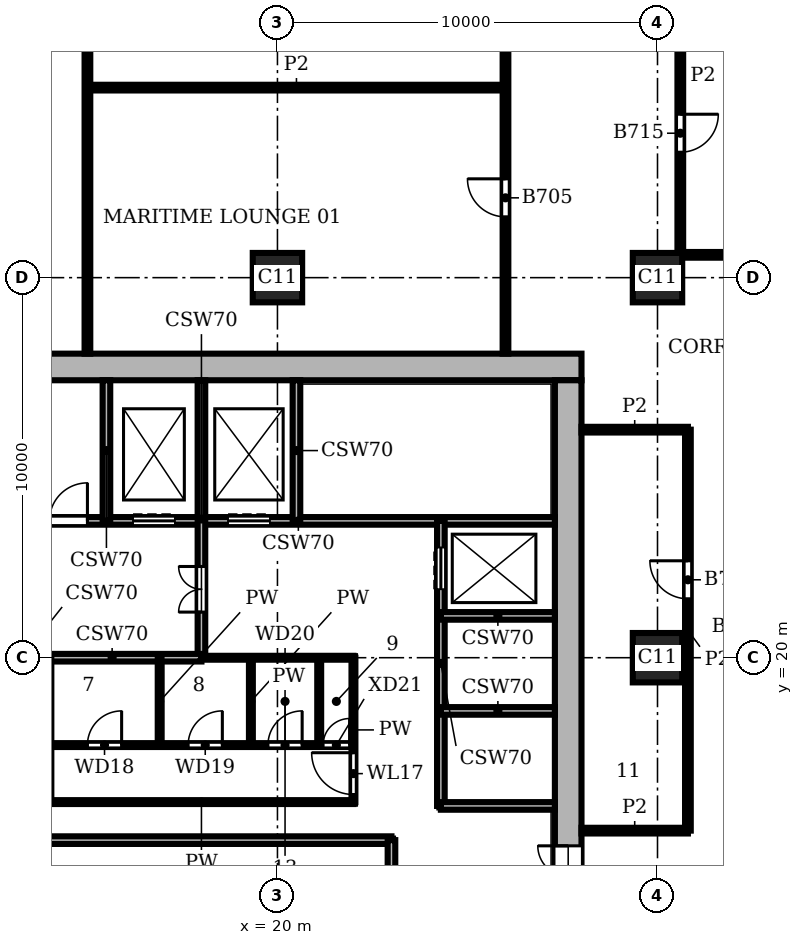
"""IFC4 building model, lengths in metres.
Left out: names, types, materials, properties, quantities, classifications, styles, units other than length and angle.
Written with IfcOpenShell. Run it as: python <this file> out.ifc"""

import sys

from ifc_helpers import new_model, si_unit, direction, frame, frame_2d, origin, origin_2d, place, context, subcontext, project, spatial, rectangle, extrude, element, fill, save


model = new_model("IFC4")
c1 = context("Model", 3, precision=1e-05, world=origin(), true_north=direction((0.0, 1.0)))
c2 = subcontext(c1, "Body", "Model", "MODEL_VIEW")
j1 = project(units=[si_unit("LENGTHUNIT", "METRE"), si_unit("PLANEANGLEUNIT", "RADIAN")], contexts=[c1])
p1 = place(None, origin())
s1 = spatial("IfcSite", under=j1, at=p1, CompositionType="ELEMENT")
p2 = place(p1, origin())
s2 = spatial("IfcBuilding", under=s1, at=p2, CompositionType="ELEMENT")
p3 = place(p2, frame((0.0, 0.0, 201.9)))
s3 = spatial("IfcBuildingStorey", under=s2, at=p3, CompositionType="ELEMENT", Elevation=201.9)
for number, where, z_axis, x_axis in (
    (1, (20.0, 30.0, 0.0), (0.0, 0.0, 1.0), (1.0, 0.0, 0.0)),
    (2, (30.0, 20.0, 0.0), (0.0, 0.0, 1.0), (1.0, 0.0, 0.0)),
    (3, (30.0, 30.0, 0.0), (0.0, 0.0, 1.0), (1.0, 0.0, 0.0)),
):
    element("IfcColumn", number, at=place(p3, frame(where, z_axis=z_axis, x_axis=x_axis)), inside=s3, PredefinedType="COLUMN", context=c2, shape_type="SweptSolid", body=[
        extrude(rectangle(XDim=1.3, YDim=1.3, at=origin_2d()), origin(), (0.0, 0.0, 1.0), 3.9),
    ])
p4 = place(p3, frame((27.65, 8.7, 0.0), z_axis=(0.0, 0.0, 1.0), x_axis=(0.0, 1.0, 0.0)))
e4 = element("IfcWall", 4, at=p4, inside=s3, PredefinedType="SHEAR", context=c2, shape_type="SweptSolid", body=[
    extrude(rectangle(XDim=18.6, YDim=0.7, at=frame_2d((9.3, 0.0))), origin(), (0.0, 0.0, 1.0), 3.9),
])
p5 = place(p4, frame((4.75, 0.0, 0.0)))
e5 = element("IfcOpeningElement", 5, at=p5, cuts=e4, PredefinedType="OPENING", context=c2, shape_type="SweptSolid", body=[
    extrude(rectangle(XDim=1.6, YDim=2.1, at=frame_2d((0.8, 1.05))), frame((0.0, 0.36, 0.0), z_axis=(0.0, -1.0, 0.0), x_axis=(1.0, 0.0, 0.0)), (0.0, 0.0, 1.0), 0.72),
])
p6 = place(p3, frame((28.0, 27.65, 0.0), z_axis=(0.0, 0.0, 1.0), x_axis=(-1.0, 0.0, 0.0)))
e6 = element("IfcWall", 6, at=p6, inside=s3, PredefinedType="SHEAR", context=c2, shape_type="SweptSolid", body=[
    extrude(rectangle(XDim=20.0, YDim=0.7, at=frame_2d((10.0, 0.0))), origin(), (0.0, 0.0, 1.0), 3.9),
])
p7 = place(p3, frame((33.362, 33.974, 0.0), z_axis=(0.0, 0.0, 1.0), x_axis=(-0.382655745237, 0.923891000409, 0.0)))
e7 = element("IfcWall", 7, at=p7, inside=s3, PredefinedType="SOLIDWALL", context=c2, shape_type="SweptSolid", body=[
    extrude(rectangle(XDim=6.053, YDim=0.4, at=frame_2d((3.027, 0.0))), origin(), (0.0, 0.0, 1.0), 3.9),
])
p8 = place(p7, frame((0.227, 0.0, 0.9)))
e8 = element("IfcOpeningElement", 8, at=p8, cuts=e7, PredefinedType="OPENING", context=c2, shape_type="SweptSolid", body=[
    extrude(rectangle(XDim=5.6, YDim=2.35, at=frame_2d((2.8, 1.175))), frame((0.0, 0.21, 0.0), z_axis=(0.0, -1.0, 0.0), x_axis=(1.0, 0.0, 0.0)), (0.0, 0.0, 1.0), 0.42),
])
p9 = place(p3, frame((13.3, 15.2, 0.0), z_axis=(0.0, 0.0, 1.0), x_axis=(1.0, 0.0, 0.0)))
e9 = element("IfcWall", 9, at=p9, inside=s3, PredefinedType="SHEAR", context=c2, shape_type="SweptSolid", body=[
    extrude(rectangle(XDim=9.7, YDim=0.2, at=frame_2d((4.85, 0.0))), origin(), (0.0, 0.0, 1.0), 3.58),
])
p10 = place(p3, frame((24.3, 16.1, 0.0), z_axis=(0.0, 0.0, 1.0), x_axis=(1.0, 0.0, 0.0)))
e10 = element("IfcWall", 10, at=p10, inside=s3, PredefinedType="SHEAR", context=c2, shape_type="SweptSolid", body=[
    extrude(rectangle(XDim=3.0, YDim=0.2, at=frame_2d((1.5, 0.0))), origin(), (0.0, 0.0, 1.0), 3.58),
])
p11 = place(p3, frame((14.0, 16.2, 0.0), z_axis=(0.0, 0.0, 1.0), x_axis=(1.0, 0.0, 0.0)))
e11 = element("IfcWall", 11, at=p11, inside=s3, PredefinedType="PARTITIONING", context=c2, shape_type="SweptSolid", body=[
    extrude(rectangle(XDim=8.0, YDim=0.1, at=frame_2d((4.0, 0.0))), origin(), (0.0, 0.0, 1.0), 3.58),
])
p12 = place(p3, frame((14.0, 17.7, 0.0), z_axis=(0.0, 0.0, 1.0), x_axis=(1.0, 0.0, 0.0)))
e12 = element("IfcWall", 12, at=p12, inside=s3, PredefinedType="PARTITIONING", context=c2, shape_type="SweptSolid", body=[
    extrude(rectangle(XDim=8.0, YDim=0.1, at=frame_2d((4.0, 0.0))), origin(), (0.0, 0.0, 1.0), 3.58),
])
p13 = place(p12, frame((1.0, 0.0, 0.0)))
e13 = element("IfcOpeningElement", 13, at=p13, cuts=e12, PredefinedType="OPENING", context=c2, shape_type="SweptSolid", body=[
    extrude(rectangle(XDim=0.9, YDim=2.1, at=frame_2d((0.45, 1.05))), frame((0.0, 0.06, 0.0), z_axis=(0.0, -1.0, 0.0), x_axis=(1.0, 0.0, 0.0)), (0.0, 0.0, 1.0), 0.12),
])
p14 = place(p12, frame((3.65, 0.0, 0.0)))
e14 = element("IfcOpeningElement", 14, at=p14, cuts=e12, PredefinedType="OPENING", context=c2, shape_type="SweptSolid", body=[
    extrude(rectangle(XDim=0.9, YDim=2.1, at=frame_2d((0.45, 1.05))), frame((0.0, 0.06, 0.0), z_axis=(0.0, -1.0, 0.0), x_axis=(1.0, 0.0, 0.0)), (0.0, 0.0, 1.0), 0.12),
])
p15 = place(p12, frame((5.75, 0.0, 0.0)))
e15 = element("IfcOpeningElement", 15, at=p15, cuts=e12, PredefinedType="OPENING", context=c2, shape_type="SweptSolid", body=[
    extrude(rectangle(XDim=0.9, YDim=2.1, at=frame_2d((0.45, 1.05))), frame((0.0, 0.06, 0.0), z_axis=(0.0, -1.0, 0.0), x_axis=(1.0, 0.0, 0.0)), (0.0, 0.0, 1.0), 0.12),
])
p16 = place(p12, frame((7.2, 0.0, 0.0)))
e16 = element("IfcOpeningElement", 16, at=p16, cuts=e12, PredefinedType="OPENING", context=c2, shape_type="SweptSolid", body=[
    extrude(rectangle(XDim=0.7, YDim=2.1, at=frame_2d((0.35, 1.05))), frame((0.0, 0.06, 0.0), z_axis=(0.0, -1.0, 0.0), x_axis=(1.0, 0.0, 0.0)), (0.0, 0.0, 1.0), 0.12),
])
p17 = place(p3, frame((24.3, 18.6, 0.0), z_axis=(0.0, 0.0, 1.0), x_axis=(1.0, 0.0, 0.0)))
e17 = element("IfcWall", 17, at=p17, inside=s3, PredefinedType="SHEAR", context=c2, shape_type="SweptSolid", body=[
    extrude(rectangle(XDim=3.0, YDim=0.2, at=frame_2d((1.5, 0.0))), origin(), (0.0, 0.0, 1.0), 3.58),
])
p18 = place(p3, frame((18.0, 20.0, 0.0), z_axis=(0.0, 0.0, 1.0), x_axis=(1.0, 0.0, 0.0)))
e18 = element("IfcWall", 18, at=p18, inside=s3, PredefinedType="PARTITIONING", context=c2, shape_type="SweptSolid", body=[
    extrude(rectangle(XDim=4.0, YDim=0.1, at=frame_2d((2.0, 0.0))), origin(), (0.0, 0.0, 1.0), 3.58),
])
p19 = place(p3, frame((13.3, 20.0, 0.0), z_axis=(0.0, 0.0, 1.0), x_axis=(1.0, 0.0, 0.0)))
e19 = element("IfcWall", 19, at=p19, inside=s3, PredefinedType="SHEAR", context=c2, shape_type="SweptSolid", body=[
    extrude(rectangle(XDim=4.7, YDim=0.2, at=frame_2d((2.35, 0.0))), origin(), (0.0, 0.0, 1.0), 3.58),
])
p20 = place(p3, frame((24.3, 21.1, 0.0), z_axis=(0.0, 0.0, 1.0), x_axis=(1.0, 0.0, 0.0)))
e20 = element("IfcWall", 20, at=p20, inside=s3, PredefinedType="SHEAR", context=c2, shape_type="SweptSolid", body=[
    extrude(rectangle(XDim=3.0, YDim=0.2, at=frame_2d((1.5, 0.0))), origin(), (0.0, 0.0, 1.0), 3.58),
])
p21 = place(p3, frame((13.8, 23.6, 0.0), z_axis=(0.0, 0.0, 1.0), x_axis=(1.0, 0.0, 0.0)))
e21 = element("IfcWall", 21, at=p21, inside=s3, PredefinedType="SHEAR", context=c2, shape_type="SweptSolid", body=[
    extrude(rectangle(XDim=13.5, YDim=0.2, at=frame_2d((6.75, 0.0))), origin(), (0.0, 0.0, 1.0), 3.58),
])
p22 = place(p21, frame((2.4, 0.0, 0.0)))
e22 = element("IfcOpeningElement", 22, at=p22, cuts=e21, PredefinedType="OPENING", context=c2, shape_type="SweptSolid", body=[
    extrude(rectangle(XDim=1.1, YDim=2.1, at=frame_2d((0.55, 1.05))), frame((0.0, 0.11, 0.0), z_axis=(0.0, -1.0, 0.0), x_axis=(1.0, 0.0, 0.0)), (0.0, 0.0, 1.0), 0.22),
])
p23 = place(p21, frame((4.9, 0.0, 0.0)))
e23 = element("IfcOpeningElement", 23, at=p23, cuts=e21, PredefinedType="OPENING", context=c2, shape_type="SweptSolid", body=[
    extrude(rectangle(XDim=1.1, YDim=2.1, at=frame_2d((0.55, 1.05))), frame((0.0, 0.11, 0.0), z_axis=(0.0, -1.0, 0.0), x_axis=(1.0, 0.0, 0.0)), (0.0, 0.0, 1.0), 0.22),
])
p24 = place(p21, frame((0.2, 0.0, 0.0)))
e24 = element("IfcOpeningElement", 24, at=p24, cuts=e21, PredefinedType="OPENING", context=c2, shape_type="SweptSolid", body=[
    extrude(rectangle(XDim=1.0, YDim=2.1, at=frame_2d((0.5, 1.05))), frame((0.0, 0.11, 0.0), z_axis=(0.0, -1.0, 0.0), x_axis=(1.0, 0.0, 0.0)), (0.0, 0.0, 1.0), 0.22),
])
p25 = place(p3, frame((15.5, 23.6, 0.0), z_axis=(0.0, 0.0, 1.0), x_axis=(0.0, 1.0, 0.0)))
e25 = element("IfcWall", 25, at=p25, inside=s3, PredefinedType="SHEAR", context=c2, shape_type="SweptSolid", body=[
    extrude(rectangle(XDim=3.7, YDim=0.2, at=frame_2d((1.85, 0.0))), origin(), (0.0, 0.0, 1.0), 3.58),
])
p26 = place(p3, frame((16.9, 17.7, 0.0), z_axis=(0.0, 0.0, 1.0), x_axis=(0.0, 1.0, 0.0)))
e26 = element("IfcWall", 26, at=p26, inside=s3, PredefinedType="PARTITIONING", context=c2, shape_type="SweptSolid", body=[
    extrude(rectangle(XDim=2.3, YDim=0.1, at=frame_2d((1.15, 0.0))), origin(), (0.0, 0.0, 1.0), 3.58),
])
p27 = place(p3, frame((18.0, 20.0, 0.0), z_axis=(0.0, 0.0, 1.0), x_axis=(0.0, 1.0, 0.0)))
e27 = element("IfcWall", 27, at=p27, inside=s3, PredefinedType="SHEAR", context=c2, shape_type="SweptSolid", body=[
    extrude(rectangle(XDim=7.3, YDim=0.2, at=frame_2d((3.65, 0.0))), origin(), (0.0, 0.0, 1.0), 3.58),
])
p28 = place(p27, frame((1.2, 0.0, 0.0)))
e28 = element("IfcOpeningElement", 28, at=p28, cuts=e27, PredefinedType="OPENING", context=c2, shape_type="SweptSolid", body=[
    extrude(rectangle(XDim=1.2, YDim=2.1, at=frame_2d((0.6, 1.05))), frame((0.0, 0.11, 0.0), z_axis=(0.0, -1.0, 0.0), x_axis=(1.0, 0.0, 0.0)), (0.0, 0.0, 1.0), 0.22),
])
p29 = place(p3, frame((19.3, 17.7, 0.0), z_axis=(0.0, 0.0, 1.0), x_axis=(0.0, 1.0, 0.0)))
e29 = element("IfcWall", 29, at=p29, inside=s3, PredefinedType="PARTITIONING", context=c2, shape_type="SweptSolid", body=[
    extrude(rectangle(XDim=2.3, YDim=0.1, at=frame_2d((1.15, 0.0))), origin(), (0.0, 0.0, 1.0), 3.58),
])
p30 = place(p3, frame((20.5, 23.6, 0.0), z_axis=(0.0, 0.0, 1.0), x_axis=(0.0, 1.0, 0.0)))
e30 = element("IfcWall", 30, at=p30, inside=s3, PredefinedType="SHEAR", context=c2, shape_type="SweptSolid", body=[
    extrude(rectangle(XDim=3.7, YDim=0.2, at=frame_2d((1.85, 0.0))), origin(), (0.0, 0.0, 1.0), 3.58),
])
p31 = place(p3, frame((21.1, 17.7, 0.0), z_axis=(0.0, 0.0, 1.0), x_axis=(0.0, 1.0, 0.0)))
e31 = element("IfcWall", 31, at=p31, inside=s3, PredefinedType="PARTITIONING", context=c2, shape_type="SweptSolid", body=[
    extrude(rectangle(XDim=2.3, YDim=0.1, at=frame_2d((1.15, 0.0))), origin(), (0.0, 0.0, 1.0), 3.58),
])
p32 = place(p3, frame((22.0, 16.2, 0.0), z_axis=(0.0, 0.0, 1.0), x_axis=(0.0, 1.0, 0.0)))
e32 = element("IfcWall", 32, at=p32, inside=s3, PredefinedType="PARTITIONING", context=c2, shape_type="SweptSolid", body=[
    extrude(rectangle(XDim=3.8, YDim=0.1, at=frame_2d((1.9, 0.0))), origin(), (0.0, 0.0, 1.0), 3.58),
])
p33 = place(p32, frame((0.2, 0.0, 0.0)))
e33 = element("IfcOpeningElement", 33, at=p33, cuts=e32, PredefinedType="OPENING", context=c2, shape_type="SweptSolid", body=[
    extrude(rectangle(XDim=1.1, YDim=2.1, at=frame_2d((0.55, 1.05))), frame((0.0, 0.06, 0.0), z_axis=(0.0, -1.0, 0.0), x_axis=(1.0, 0.0, 0.0)), (0.0, 0.0, 1.0), 0.12),
])
p34 = place(p3, frame((23.0, 12.4, 0.0), z_axis=(0.0, 0.0, 1.0), x_axis=(0.0, 1.0, 0.0)))
e34 = element("IfcWall", 34, at=p34, inside=s3, PredefinedType="SHEAR", context=c2, shape_type="SweptSolid", body=[
    extrude(rectangle(XDim=2.8, YDim=0.2, at=frame_2d((1.4, 0.0))), origin(), (0.0, 0.0, 1.0), 3.58),
])
p35 = place(p34, frame((0.8, 0.0, 0.0)))
e35 = element("IfcOpeningElement", 35, at=p35, cuts=e34, PredefinedType="OPENING", context=c2, shape_type="SweptSolid", body=[
    extrude(rectangle(XDim=1.2, YDim=2.1, at=frame_2d((0.6, 1.05))), frame((0.0, 0.11, 0.0), z_axis=(0.0, -1.0, 0.0), x_axis=(1.0, 0.0, 0.0)), (0.0, 0.0, 1.0), 0.22),
])
p36 = place(p3, frame((24.3, 16.1, 0.0), z_axis=(0.0, 0.0, 1.0), x_axis=(0.0, 1.0, 0.0)))
e36 = element("IfcWall", 36, at=p36, inside=s3, PredefinedType="SHEAR", context=c2, shape_type="SweptSolid", body=[
    extrude(rectangle(XDim=7.5, YDim=0.2, at=frame_2d((3.75, 0.0))), origin(), (0.0, 0.0, 1.0), 3.58),
])
p37 = place(p36, frame((5.7, 0.0, 0.0)))
e37 = element("IfcOpeningElement", 37, at=p37, cuts=e36, PredefinedType="OPENING", context=c2, shape_type="SweptSolid", body=[
    extrude(rectangle(XDim=1.1, YDim=2.1, at=frame_2d((0.55, 1.05))), frame((0.0, 0.11, 0.0), z_axis=(0.0, -1.0, 0.0), x_axis=(1.0, 0.0, 0.0)), (0.0, 0.0, 1.0), 0.22),
])
p38 = place(p3, frame((15.0, 28.0, 0.0), z_axis=(0.0, 0.0, 1.0), x_axis=(0.0, 1.0, 0.0)))
e38 = element("IfcWall", 38, at=p38, inside=s3, PredefinedType="PARTITIONING", context=c2, shape_type="SweptSolid", body=[
    extrude(rectangle(XDim=29.6, YDim=0.15, at=frame_2d((14.8, 0.0))), origin(), (0.0, 0.0, 1.0), 3.58),
])
p39 = place(p3, frame((26.0, 28.0, 0.0), z_axis=(0.0, 0.0, 1.0), x_axis=(0.0, 1.0, 0.0)))
e39 = element("IfcWall", 39, at=p39, inside=s3, PredefinedType="PARTITIONING", context=c2, shape_type="SweptSolid", body=[
    extrude(rectangle(XDim=29.6, YDim=0.15, at=frame_2d((14.8, 0.0))), origin(), (0.0, 0.0, 1.0), 3.58),
])
p40 = place(p39, frame((3.6, 0.0, 0.0)))
e40 = element("IfcOpeningElement", 40, at=p40, cuts=e39, PredefinedType="OPENING", context=c2, shape_type="SweptSolid", body=[
    extrude(rectangle(XDim=1.0, YDim=2.1, at=frame_2d((0.5, 1.05))), frame((0.0, 0.085, 0.0), z_axis=(0.0, -1.0, 0.0), x_axis=(1.0, 0.0, 0.0)), (0.0, 0.0, 1.0), 0.17),
])
p41 = place(p39, frame((11.85, 0.0, 0.0)))
e41 = element("IfcOpeningElement", 41, at=p41, cuts=e39, PredefinedType="OPENING", context=c2, shape_type="SweptSolid", body=[
    extrude(rectangle(XDim=1.0, YDim=2.1, at=frame_2d((0.5, 1.05))), frame((0.0, 0.085, 0.0), z_axis=(0.0, -1.0, 0.0), x_axis=(1.0, 0.0, 0.0)), (0.0, 0.0, 1.0), 0.17),
])
p42 = place(p39, frame((21.35, 0.0, 0.0)))
e42 = element("IfcOpeningElement", 42, at=p42, cuts=e39, PredefinedType="OPENING", context=c2, shape_type="SweptSolid", body=[
    extrude(rectangle(XDim=1.0, YDim=2.1, at=frame_2d((0.5, 1.05))), frame((0.0, 0.085, 0.0), z_axis=(0.0, -1.0, 0.0), x_axis=(1.0, 0.0, 0.0)), (0.0, 0.0, 1.0), 0.17),
])
p43 = place(p3, frame((30.6, 30.65, 0.0), z_axis=(0.0, 0.0, 1.0), x_axis=(0.0, 1.0, 0.0)))
e43 = element("IfcWall", 43, at=p43, inside=s3, PredefinedType="PARTITIONING", context=c2, shape_type="SweptSolid", body=[
    extrude(rectangle(XDim=9.288, YDim=0.15, at=frame_2d((4.644, 0.0))), origin(), (0.0, 0.0, 1.0), 3.58),
])
p44 = place(p43, frame((2.65, 0.0, 0.0)))
e44 = element("IfcOpeningElement", 44, at=p44, cuts=e43, PredefinedType="OPENING", context=c2, shape_type="SweptSolid", body=[
    extrude(rectangle(XDim=1.0, YDim=2.1, at=frame_2d((0.5, 1.05))), frame((0.0, 0.085, 0.0), z_axis=(0.0, -1.0, 0.0), x_axis=(1.0, 0.0, 0.0)), (0.0, 0.0, 1.0), 0.17),
])
p45 = place(p3, frame((30.8, 15.45, 0.0), z_axis=(0.0, 0.0, 1.0), x_axis=(0.0, 1.0, 0.0)))
e45 = element("IfcWall", 45, at=p45, inside=s3, PredefinedType="PARTITIONING", context=c2, shape_type="SweptSolid", body=[
    extrude(rectangle(XDim=10.55, YDim=0.15, at=frame_2d((5.275, 0.0))), origin(), (0.0, 0.0, 1.0), 3.58),
])
p46 = place(p45, frame((6.1, 0.0, 0.0)))
e46 = element("IfcOpeningElement", 46, at=p46, cuts=e45, PredefinedType="OPENING", context=c2, shape_type="SweptSolid", body=[
    extrude(rectangle(XDim=1.0, YDim=2.1, at=frame_2d((0.5, 1.05))), frame((0.0, 0.085, 0.0), z_axis=(0.0, -1.0, 0.0), x_axis=(1.0, 0.0, 0.0)), (0.0, 0.0, 1.0), 0.17),
])
for number, where, z_axis, x_axis in (
    (47, (28.0, 15.45, 0.0), (0.0, 0.0, 1.0), (1.0, 0.0, 0.0)),
    (48, (28.0, 26.0, 0.0), (0.0, 0.0, 1.0), (1.0, 0.0, 0.0)),
):
    element("IfcWall", number, at=place(p3, frame(where, z_axis=z_axis, x_axis=x_axis)), inside=s3, PredefinedType="PARTITIONING", context=c2, shape_type="SweptSolid", body=[
        extrude(rectangle(XDim=2.8, YDim=0.15, at=frame_2d((1.4, 0.0))), origin(), (0.0, 0.0, 1.0), 3.58),
    ])
p47 = place(p3, frame((30.65, 30.6, 0.0), z_axis=(0.0, 0.0, 1.0), x_axis=(1.0, 0.0, 0.0)))
e49 = element("IfcWall", 49, at=p47, inside=s3, PredefinedType="PARTITIONING", context=c2, shape_type="SweptSolid", body=[
    extrude(rectangle(XDim=9.288, YDim=0.15, at=frame_2d((4.644, 0.0))), origin(), (0.0, 0.0, 1.0), 3.58),
])
p48 = place(p3, frame((15.0, 35.0, 0.0), z_axis=(0.0, 0.0, 1.0), x_axis=(1.0, 0.0, 0.0)))
e50 = element("IfcWall", 50, at=p48, inside=s3, PredefinedType="PARTITIONING", context=c2, shape_type="SweptSolid", body=[
    extrude(rectangle(XDim=11.0, YDim=0.15, at=frame_2d((5.5, 0.0))), origin(), (0.0, 0.0, 1.0), 3.58),
])
p49 = place(p8, origin())
e51 = element("IfcWindow", 51, at=p49, inside=s3, PartitioningType="SINGLE_PANEL", PredefinedType="WINDOW", context=c2, shape_type="SweptSolid", body=[
    extrude(rectangle(XDim=5.6, YDim=2.35, at=frame_2d((2.8, 1.175))), frame((0.0, 0.16, 0.0), z_axis=(0.0, -1.0, 0.0), x_axis=(1.0, 0.0, 0.0)), (0.0, 0.0, 1.0), 0.06),
])
fill(e8, e51)
p50 = place(p37, origin())
e52 = element("IfcDoor", 52, at=p50, inside=s3, OperationType="DOUBLE_DOOR_SLIDING", PredefinedType="DOOR", context=c2, shape_type="SweptSolid", body=[
    extrude(rectangle(XDim=1.1, YDim=2.1, at=frame_2d((0.55, 1.05))), frame((0.0, 0.025, 0.0), z_axis=(0.0, -1.0, 0.0), x_axis=(1.0, 0.0, 0.0)), (0.0, 0.0, 1.0), 0.05),
])
fill(e37, e52)
p51 = place(p22, origin())
e53 = element("IfcDoor", 53, at=p51, inside=s3, OperationType="DOUBLE_DOOR_SLIDING", PredefinedType="DOOR", context=c2, shape_type="SweptSolid", body=[
    extrude(rectangle(XDim=1.1, YDim=2.1, at=frame_2d((0.55, 1.05))), frame((0.0, 0.025, 0.0), z_axis=(0.0, -1.0, 0.0), x_axis=(1.0, 0.0, 0.0)), (0.0, 0.0, 1.0), 0.05),
])
fill(e22, e53)
p52 = place(p23, origin())
e54 = element("IfcDoor", 54, at=p52, inside=s3, OperationType="DOUBLE_DOOR_SLIDING", PredefinedType="DOOR", context=c2, shape_type="SweptSolid", body=[
    extrude(rectangle(XDim=1.1, YDim=2.1, at=frame_2d((0.55, 1.05))), frame((0.0, 0.025, 0.0), z_axis=(0.0, -1.0, 0.0), x_axis=(1.0, 0.0, 0.0)), (0.0, 0.0, 1.0), 0.05),
])
fill(e23, e54)
p53 = place(p24, origin())
e55 = element("IfcDoor", 55, at=p53, inside=s3, OperationType="SINGLE_SWING_RIGHT", PredefinedType="DOOR", context=c2, shape_type="SweptSolid", body=[
    extrude(rectangle(XDim=1.0, YDim=2.1, at=frame_2d((0.5, 1.05))), frame((0.0, 0.025, 0.0), z_axis=(0.0, -1.0, 0.0), x_axis=(1.0, 0.0, 0.0)), (0.0, 0.0, 1.0), 0.05),
])
fill(e24, e55)
p54 = place(p28, origin())
e56 = element("IfcDoor", 56, at=p54, inside=s3, OperationType="DOUBLE_DOOR_SINGLE_SWING", PredefinedType="DOOR", context=c2, shape_type="SweptSolid", body=[
    extrude(rectangle(XDim=1.2, YDim=2.1, at=frame_2d((0.6, 1.05))), frame((0.0, 0.025, 0.0), z_axis=(0.0, -1.0, 0.0), x_axis=(1.0, 0.0, 0.0)), (0.0, 0.0, 1.0), 0.05),
])
fill(e28, e56)
p55 = place(p33, origin())
e57 = element("IfcDoor", 57, at=p55, inside=s3, OperationType="SINGLE_SWING_RIGHT", PredefinedType="DOOR", context=c2, shape_type="SweptSolid", body=[
    extrude(rectangle(XDim=1.1, YDim=2.1, at=frame_2d((0.55, 1.05))), frame((0.0, 0.025, 0.0), z_axis=(0.0, -1.0, 0.0), x_axis=(1.0, 0.0, 0.0)), (0.0, 0.0, 1.0), 0.05),
])
fill(e33, e57)
p56 = place(p13, origin())
e58 = element("IfcDoor", 58, at=p56, inside=s3, OperationType="SINGLE_SWING_RIGHT", PredefinedType="DOOR", context=c2, shape_type="SweptSolid", body=[
    extrude(rectangle(XDim=0.9, YDim=2.1, at=frame_2d((0.45, 1.05))), frame((0.0, 0.025, 0.0), z_axis=(0.0, -1.0, 0.0), x_axis=(1.0, 0.0, 0.0)), (0.0, 0.0, 1.0), 0.05),
])
fill(e13, e58)
p57 = place(p14, origin())
e59 = element("IfcDoor", 59, at=p57, inside=s3, OperationType="SINGLE_SWING_RIGHT", PredefinedType="DOOR", context=c2, shape_type="SweptSolid", body=[
    extrude(rectangle(XDim=0.9, YDim=2.1, at=frame_2d((0.45, 1.05))), frame((0.0, 0.025, 0.0), z_axis=(0.0, -1.0, 0.0), x_axis=(1.0, 0.0, 0.0)), (0.0, 0.0, 1.0), 0.05),
])
fill(e14, e59)
p58 = place(p15, origin())
e60 = element("IfcDoor", 60, at=p58, inside=s3, OperationType="SINGLE_SWING_RIGHT", PredefinedType="DOOR", context=c2, shape_type="SweptSolid", body=[
    extrude(rectangle(XDim=0.9, YDim=2.1, at=frame_2d((0.45, 1.05))), frame((0.0, 0.025, 0.0), z_axis=(0.0, -1.0, 0.0), x_axis=(1.0, 0.0, 0.0)), (0.0, 0.0, 1.0), 0.05),
])
fill(e15, e60)
p59 = place(p16, origin())
e61 = element("IfcDoor", 61, at=p59, inside=s3, OperationType="SINGLE_SWING_RIGHT", PredefinedType="DOOR", context=c2, shape_type="SweptSolid", body=[
    extrude(rectangle(XDim=0.7, YDim=2.1, at=frame_2d((0.35, 1.05))), frame((0.0, 0.025, 0.0), z_axis=(0.0, -1.0, 0.0), x_axis=(1.0, 0.0, 0.0)), (0.0, 0.0, 1.0), 0.05),
])
fill(e16, e61)
p60 = place(p5, origin())
e62 = element("IfcDoor", 62, at=p60, inside=s3, OperationType="DOUBLE_DOOR_SINGLE_SWING", PredefinedType="DOOR", context=c2, shape_type="SweptSolid", body=[
    extrude(rectangle(XDim=1.6, YDim=2.1, at=frame_2d((0.8, 1.05))), frame((0.0, 0.025, 0.0), z_axis=(0.0, -1.0, 0.0), x_axis=(1.0, 0.0, 0.0)), (0.0, 0.0, 1.0), 0.05),
])
fill(e5, e62)
p61 = place(p40, origin())
e63 = element("IfcDoor", 63, at=p61, inside=s3, OperationType="SINGLE_SWING_RIGHT", PredefinedType="DOOR", context=c2, shape_type="SweptSolid", body=[
    extrude(rectangle(XDim=1.0, YDim=2.1, at=frame_2d((0.5, 1.05))), frame((0.0, 0.025, 0.0), z_axis=(0.0, -1.0, 0.0), x_axis=(1.0, 0.0, 0.0)), (0.0, 0.0, 1.0), 0.05),
])
fill(e40, e63)
p62 = place(p44, frame((1.0, 0.0, 0.0), z_axis=(0.0, 0.0, 1.0), x_axis=(-1.0, 0.0, 0.0)))
e64 = element("IfcDoor", 64, at=p62, inside=s3, OperationType="SINGLE_SWING_LEFT", PredefinedType="DOOR", context=c2, shape_type="SweptSolid", body=[
    extrude(rectangle(XDim=1.0, YDim=2.1, at=frame_2d((0.5, 1.05))), frame((0.0, 0.025, 0.0), z_axis=(0.0, -1.0, 0.0), x_axis=(1.0, 0.0, 0.0)), (0.0, 0.0, 1.0), 0.05),
])
fill(e44, e64)
p63 = place(p46, origin())
e65 = element("IfcDoor", 65, at=p63, inside=s3, OperationType="SINGLE_SWING_RIGHT", PredefinedType="DOOR", context=c2, shape_type="SweptSolid", body=[
    extrude(rectangle(XDim=1.0, YDim=2.1, at=frame_2d((0.5, 1.05))), frame((0.0, 0.025, 0.0), z_axis=(0.0, -1.0, 0.0), x_axis=(1.0, 0.0, 0.0)), (0.0, 0.0, 1.0), 0.05),
])
fill(e46, e65)
save(model, sys.argv[1])
